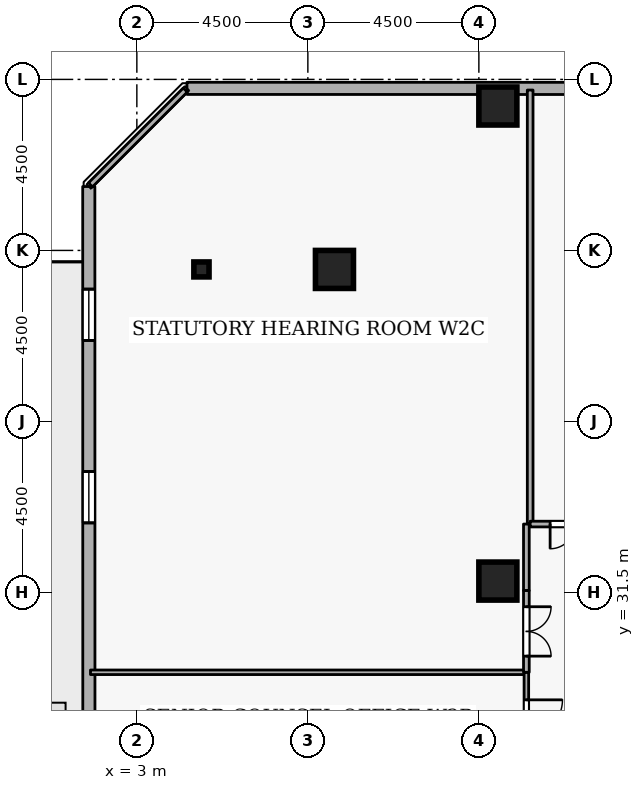
"""IFC4 building model, lengths in metres.
Left out: names, types, materials, properties, quantities, classifications, styles, units other than length and angle.
Written with IfcOpenShell. Run it as: python <this file> out.ifc"""

import sys

from ifc_helpers import new_model, si_unit, direction, frame, frame_2d, origin, origin_2d, place, context, subcontext, project, spatial, rectangle, i_section, extrude, element, fill, save


model = new_model("IFC4")
c1 = context("Model", 3, precision=1e-05, world=origin(), true_north=direction((0.0, 1.0)))
c2 = subcontext(c1, "Body", "Model", "MODEL_VIEW")
j1 = project(units=[si_unit("LENGTHUNIT", "METRE"), si_unit("PLANEANGLEUNIT", "RADIAN")], contexts=[c1])
p1 = place(None, origin())
s1 = spatial("IfcSite", under=j1, at=p1, CompositionType="ELEMENT")
p2 = place(p1, origin())
s2 = spatial("IfcBuilding", under=s1, at=p2, CompositionType="ELEMENT")
p3 = place(p2, frame((0.0, 0.0, 251.1)))
s3 = spatial("IfcBuildingStorey", under=s2, at=p3, CompositionType="ELEMENT", Elevation=251.1)
for number, where, z_axis, x_axis in (
    (1, (12.5, 44.3, 0.0), (0.0, 0.0, 1.0), (1.0, 0.0, 0.0)),
    (2, (8.2, 40.0, 0.0), (0.0, 0.0, 1.0), (1.0, 0.0, 0.0)),
    (3, (12.5, 31.8, 0.0), (0.0, 0.0, 1.0), (1.0, 0.0, 0.0)),
):
    element("IfcColumn", number, at=place(p3, frame(where, z_axis=z_axis, x_axis=x_axis)), inside=s3, PredefinedType="COLUMN", context=c2, shape_type="SweptSolid", body=[
        extrude(rectangle(XDim=1.0, YDim=1.0, at=origin_2d()), origin(), (0.0, 0.0, 1.0), 3.6),
    ])
p4 = place(p3, frame((4.7, 40.0, 0.0), z_axis=(0.0, 0.0, 1.0), x_axis=(1.0, 0.0, 0.0)))
e4 = element("IfcColumn", 4, at=p4, inside=s3, PredefinedType="COLUMN", context=c2, shape_type="SweptSolid", body=[
    extrude(i_section(OverallWidth=0.399, OverallDepth=0.394, WebThickness=0.023, FlangeThickness=0.037, FilletRadius=0.015, at=origin_2d()), origin(), (0.0, 0.0, 1.0), 3.6),
])
p5 = place(p3, frame((38.751, 44.758, 0.0), z_axis=(0.0, 0.0, 1.0), x_axis=(-0.999999983007, 0.000184351399, 0.0)))
e5 = element("IfcWall", 5, at=p5, inside=s3, PredefinedType="STANDARD", context=c2, shape_type="SweptSolid", body=[
    extrude(rectangle(XDim=34.432, YDim=0.32, at=frame_2d((17.216, 0.0))), origin(), (0.0, 0.0, 1.0), 2.22),
])
p6 = place(p5, frame((7.5, 0.0, 0.72)))
e6 = element("IfcOpeningElement", 6, at=p6, cuts=e5, PredefinedType="OPENING", context=c2, shape_type="SweptSolid", body=[
    extrude(rectangle(XDim=1.35, YDim=1.05, at=frame_2d((0.675, 0.525))), frame((0.0, 0.17, 0.0), z_axis=(0.0, -1.0, 0.0), x_axis=(1.0, 0.0, 0.0)), (0.0, 0.0, 1.0), 0.34),
])
p7 = place(p5, frame((17.1, 0.0, 0.72)))
e7 = element("IfcOpeningElement", 7, at=p7, cuts=e5, PredefinedType="OPENING", context=c2, shape_type="SweptSolid", body=[
    extrude(rectangle(XDim=1.35, YDim=1.05, at=frame_2d((0.675, 0.525))), frame((0.0, 0.17, 0.0), z_axis=(0.0, -1.0, 0.0), x_axis=(1.0, 0.0, 0.0)), (0.0, 0.0, 1.0), 0.34),
])
p8 = place(p3, frame((1.735, 42.181, 0.0), z_axis=(0.0, 0.0, 1.0), x_axis=(0.000184351399, -0.999999983007, 0.0)))
e8 = element("IfcWall", 8, at=p8, inside=s3, PredefinedType="STANDARD", context=c2, shape_type="SweptSolid", body=[
    extrude(rectangle(XDim=34.432, YDim=0.32, at=frame_2d((17.216, 0.0))), origin(), (0.0, 0.0, 1.0), 2.22),
])
p9 = place(p8, frame((19.016, 0.0, 0.0)))
e9 = element("IfcOpeningElement", 9, at=p9, cuts=e8, PredefinedType="OPENING", context=c2, shape_type="SweptSolid", body=[
    extrude(rectangle(XDim=1.0, YDim=2.08, at=frame_2d((0.5, 1.04))), frame((0.0, 0.17, 0.0), z_axis=(0.0, -1.0, 0.0), x_axis=(1.0, 0.0, 0.0)), (0.0, 0.0, 1.0), 0.34),
])
p10 = place(p8, frame((2.7, 0.0, 0.72)))
e10 = element("IfcOpeningElement", 10, at=p10, cuts=e8, PredefinedType="OPENING", context=c2, shape_type="SweptSolid", body=[
    extrude(rectangle(XDim=1.35, YDim=1.05, at=frame_2d((0.675, 0.525))), frame((0.0, 0.17, 0.0), z_axis=(0.0, -1.0, 0.0), x_axis=(1.0, 0.0, 0.0)), (0.0, 0.0, 1.0), 0.34),
])
p11 = place(p8, frame((7.5, 0.0, 0.72)))
e11 = element("IfcOpeningElement", 11, at=p11, cuts=e8, PredefinedType="OPENING", context=c2, shape_type="SweptSolid", body=[
    extrude(rectangle(XDim=1.35, YDim=1.05, at=frame_2d((0.675, 0.525))), frame((0.0, 0.17, 0.0), z_axis=(0.0, -1.0, 0.0), x_axis=(1.0, 0.0, 0.0)), (0.0, 0.0, 1.0), 0.34),
])
p12 = place(p8, frame((21.9, 0.0, 0.72)))
e12 = element("IfcOpeningElement", 12, at=p12, cuts=e8, PredefinedType="OPENING", context=c2, shape_type="SweptSolid", body=[
    extrude(rectangle(XDim=1.35, YDim=1.05, at=frame_2d((0.675, 0.525))), frame((0.0, 0.17, 0.0), z_axis=(0.0, -1.0, 0.0), x_axis=(1.0, 0.0, 0.0)), (0.0, 0.0, 1.0), 0.34),
])
p13 = place(p8, frame((26.7, 0.0, 0.72)))
e13 = element("IfcOpeningElement", 13, at=p13, cuts=e8, PredefinedType="OPENING", context=c2, shape_type="SweptSolid", body=[
    extrude(rectangle(XDim=1.35, YDim=1.05, at=frame_2d((0.675, 0.525))), frame((0.0, 0.17, 0.0), z_axis=(0.0, -1.0, 0.0), x_axis=(1.0, 0.0, 0.0)), (0.0, 0.0, 1.0), 0.34),
])
p14 = place(p3, frame((13.35, 33.3, 0.0), z_axis=(0.0, 0.0, 1.0), x_axis=(0.0, 1.0, 0.0)))
e14 = element("IfcWall", 14, at=p14, inside=s3, PredefinedType="PARTITIONING", context=c2, shape_type="SweptSolid", body=[
    extrude(rectangle(XDim=11.42, YDim=0.15, at=frame_2d((5.71, 0.0))), origin(), (0.0, 0.0, 1.0), 3.32),
])
p15 = place(p3, frame((15.7, 33.3, 0.0), z_axis=(0.0, 0.0, 1.0), x_axis=(-1.0, 0.0, 0.0)))
e15 = element("IfcWall", 15, at=p15, inside=s3, PredefinedType="PARTITIONING", context=c2, shape_type="SweptSolid", body=[
    extrude(rectangle(XDim=2.35, YDim=0.15, at=frame_2d((1.175, 0.0))), origin(), (0.0, 0.0, 1.0), 3.32),
])
p16 = place(p15, frame((0.525, 0.0, 0.0)))
e16 = element("IfcOpeningElement", 16, at=p16, cuts=e15, PredefinedType="OPENING", context=c2, shape_type="SweptSolid", body=[
    extrude(rectangle(XDim=1.3, YDim=2.12, at=frame_2d((0.65, 1.06))), frame((0.0, 0.085, 0.0), z_axis=(0.0, -1.0, 0.0), x_axis=(1.0, 0.0, 0.0)), (0.0, 0.0, 1.0), 0.17),
])
p17 = place(p3, frame((1.78, 29.4, 0.0), z_axis=(0.0, 0.0, 1.0), x_axis=(1.0, 0.0, 0.0)))
e17 = element("IfcWall", 17, at=p17, inside=s3, PredefinedType="PARTITIONING", context=c2, shape_type="SweptSolid", body=[
    extrude(rectangle(XDim=11.47, YDim=0.12, at=frame_2d((5.735, 0.0))), origin(), (0.0, 0.0, 1.0), 3.32),
])
p18 = place(p3, frame((13.25, 29.4, 0.0), z_axis=(0.0, 0.0, 1.0), x_axis=(0.0, -1.0, 0.0)))
e18 = element("IfcWall", 18, at=p18, inside=s3, PredefinedType="PARTITIONING", context=c2, shape_type="SweptSolid", body=[
    extrude(rectangle(XDim=2.4, YDim=0.12, at=frame_2d((1.2, 0.0))), origin(), (0.0, 0.0, 1.0), 3.32),
])
p19 = place(p18, frame((0.725, 0.0, 0.0)))
e19 = element("IfcOpeningElement", 19, at=p19, cuts=e18, PredefinedType="OPENING", context=c2, shape_type="SweptSolid", body=[
    extrude(rectangle(XDim=0.95, YDim=2.1, at=frame_2d((0.475, 1.05))), frame((0.0, 0.07, 0.0), z_axis=(0.0, -1.0, 0.0), x_axis=(1.0, 0.0, 0.0)), (0.0, 0.0, 1.0), 0.14),
])
p20 = place(p3, frame((1.78, 42.225, 0.0), z_axis=(0.0, 0.0, 1.0), x_axis=(0.707106781187, 0.707106781187, 0.0)))
e20 = element("IfcWall", 20, at=p20, inside=s3, PredefinedType="PARTITIONING", context=c2, shape_type="SweptSolid", body=[
    extrude(rectangle(XDim=3.528, YDim=0.15, at=frame_2d((1.764, 0.0))), origin(), (0.0, 0.0, 1.0), 3.32),
])
p21 = place(p3, frame((13.25, 33.3, 0.0), z_axis=(0.0, 0.0, 1.0), x_axis=(0.0, -1.0, 0.0)))
e21 = element("IfcWall", 21, at=p21, inside=s3, PredefinedType="PARTITIONING", context=c2, shape_type="SweptSolid", body=[
    extrude(rectangle(XDim=1.75, YDim=0.15, at=frame_2d((0.875, 0.0))), origin(), (0.0, 0.0, 1.0), 3.32),
])
p22 = place(p3, frame((13.25, 31.55, 0.0), z_axis=(0.0, 0.0, 1.0), x_axis=(0.0, -1.0, 0.0)))
e22 = element("IfcWall", 22, at=p22, inside=s3, PredefinedType="PARTITIONING", context=c2, shape_type="SweptSolid", body=[
    extrude(rectangle(XDim=2.15, YDim=0.15, at=frame_2d((1.075, 0.0))), origin(), (0.0, 0.0, 1.0), 3.32),
])
p23 = place(p22, frame((0.425, 0.0, 0.0)))
e23 = element("IfcOpeningElement", 23, at=p23, cuts=e22, PredefinedType="OPENING", context=c2, shape_type="SweptSolid", body=[
    extrude(rectangle(XDim=1.3, YDim=2.12, at=frame_2d((0.65, 1.06))), frame((0.0, 0.085, 0.0), z_axis=(0.0, -1.0, 0.0), x_axis=(1.0, 0.0, 0.0)), (0.0, 0.0, 1.0), 0.17),
])
p24 = place(p10, origin())
e24 = element("IfcWindow", 24, at=p24, inside=s3, PartitioningType="SINGLE_PANEL", PredefinedType="WINDOW", context=c2, shape_type="SweptSolid", body=[
    extrude(rectangle(XDim=1.35, YDim=1.05, at=frame_2d((0.675, 0.525))), frame((0.0, 0.03, 0.0), z_axis=(0.0, -1.0, 0.0), x_axis=(1.0, 0.0, 0.0)), (0.0, 0.0, 1.0), 0.06),
])
fill(e10, e24)
p25 = place(p11, origin())
e25 = element("IfcWindow", 25, at=p25, inside=s3, PartitioningType="SINGLE_PANEL", PredefinedType="WINDOW", context=c2, shape_type="SweptSolid", body=[
    extrude(rectangle(XDim=1.35, YDim=1.05, at=frame_2d((0.675, 0.525))), frame((0.0, 0.03, 0.0), z_axis=(0.0, -1.0, 0.0), x_axis=(1.0, 0.0, 0.0)), (0.0, 0.0, 1.0), 0.06),
])
fill(e11, e25)
p26 = place(p16, origin())
e26 = element("IfcDoor", 26, at=p26, inside=s3, OperationType="DOUBLE_DOOR_SINGLE_SWING", PredefinedType="DOOR", context=c2, shape_type="SweptSolid", body=[
    extrude(rectangle(XDim=1.3, YDim=2.12, at=frame_2d((0.65, 1.06))), frame((0.0, 0.025, 0.0), z_axis=(0.0, -1.0, 0.0), x_axis=(1.0, 0.0, 0.0)), (0.0, 0.0, 1.0), 0.05),
])
fill(e16, e26)
p27 = place(p19, origin())
e27 = element("IfcDoor", 27, at=p27, inside=s3, OperationType="SINGLE_SWING_LEFT", PredefinedType="DOOR", context=c2, shape_type="SweptSolid", body=[
    extrude(rectangle(XDim=0.95, YDim=2.1, at=frame_2d((0.475, 1.05))), frame((0.0, 0.025, 0.0), z_axis=(0.0, -1.0, 0.0), x_axis=(1.0, 0.0, 0.0)), (0.0, 0.0, 1.0), 0.05),
])
fill(e19, e27)
p28 = place(p23, origin())
e28 = element("IfcDoor", 28, at=p28, inside=s3, OperationType="DOUBLE_DOOR_SINGLE_SWING", PredefinedType="DOOR", context=c2, shape_type="SweptSolid", body=[
    extrude(rectangle(XDim=1.3, YDim=2.12, at=frame_2d((0.65, 1.06))), frame((0.0, 0.025, 0.0), z_axis=(0.0, -1.0, 0.0), x_axis=(1.0, 0.0, 0.0)), (0.0, 0.0, 1.0), 0.05),
])
fill(e23, e28)
save(model, sys.argv[1])
